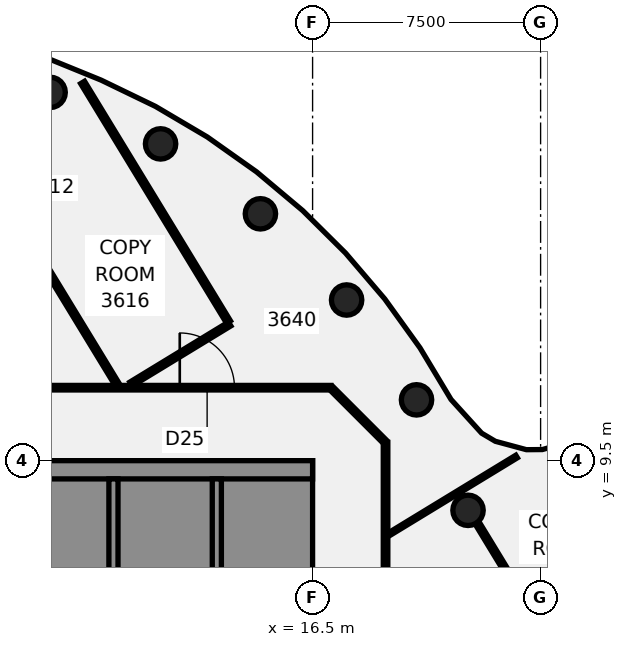
"""IFC4 building model, lengths in metres.
Left out: names, types, materials, properties, quantities, classifications, styles, units other than length and angle.
Written with IfcOpenShell. Run it as: python <this file> out.ifc"""

import sys

from ifc_helpers import new_model, si_unit, direction, frame, frame_2d, origin, origin_2d, place, context, subcontext, project, spatial, polyline, rectangle, circle, outline, extrude, element, fill, save


model = new_model("IFC4")
c1 = context("Model", 3, precision=1e-05, world=origin(), true_north=direction((0.0, 1.0)))
c2 = subcontext(c1, "Body", "Model", "MODEL_VIEW")
j1 = project(units=[si_unit("LENGTHUNIT", "METRE"), si_unit("PLANEANGLEUNIT", "RADIAN")], contexts=[c1])
p1 = place(None, origin())
s1 = spatial("IfcSite", under=j1, at=p1, CompositionType="ELEMENT")
p2 = place(p1, origin())
s2 = spatial("IfcBuilding", under=s1, at=p2, CompositionType="ELEMENT")
p3 = place(p2, frame((0.0, 0.0, 148.0)))
s3 = spatial("IfcBuildingStorey", under=s2, at=p3, CompositionType="ELEMENT", Elevation=148.0)
for number, where, z_axis, x_axis in (
    (1, (21.613, 7.866, -0.14), (0.0, 0.0, 1.0), (1.0, 0.0, 0.0)),
    (2, (19.919, 11.5, -0.14), (0.0, 0.0, 1.0), (1.0, 0.0, 0.0)),
    (3, (17.619, 14.784, -0.14), (0.0, 0.0, 1.0), (1.0, 0.0, 0.0)),
    (4, (14.784, 17.619, -0.14), (0.0, 0.0, 1.0), (1.0, 0.0, 0.0)),
    (5, (11.5, 19.919, -0.14), (0.0, 0.0, 1.0), (1.0, 0.0, 0.0)),
    (6, (7.866, 21.613, -0.14), (0.0, 0.0, 1.0), (1.0, 0.0, 0.0)),
):
    element("IfcColumn", number, at=place(p3, frame(where, z_axis=z_axis, x_axis=x_axis)), inside=s3, PredefinedType="COLUMN", context=c2, shape_type="SweptSolid", body=[
        extrude(circle(Radius=0.5, at=origin_2d()), origin(), (0.0, 0.0, 1.0), 3.75),
    ])
p4 = place(p3, frame((3.813, 22.277, 0.0), z_axis=(0.0, 0.0, 1.0), x_axis=(0.52031356714, -0.853975287611, 0.0)))
e7 = element("IfcWall", 7, at=p4, inside=s3, PredefinedType="PARTITIONING", context=c2, shape_type="SweptSolid", body=[
    extrude(rectangle(XDim=12.04, YDim=0.15, at=frame_2d((6.02, 0.0))), origin(), (0.0, 0.0, 1.0), 3.01),
])
p5 = place(p4, frame((4.023, 0.0, 0.0)))
e8 = element("IfcOpeningElement", 8, at=p5, cuts=e7, PredefinedType="OPENING", context=c2, shape_type="SweptSolid", body=[
    extrude(rectangle(XDim=0.9, YDim=2.1, at=frame_2d((0.45, 1.05))), frame((0.0, 0.085, 0.0), z_axis=(0.0, -1.0, 0.0), x_axis=(1.0, 0.0, 0.0)), (0.0, 0.0, 1.0), 0.17),
])
p6 = place(p3, frame((8.935, 21.939, 0.0), z_axis=(0.0, 0.0, 1.0), x_axis=(0.520139186157, -0.854081510761, 0.0)))
e9 = element("IfcWall", 9, at=p6, inside=s3, PredefinedType="PARTITIONING", context=c2, shape_type="SweptSolid", body=[
    extrude(rectangle(XDim=9.226, YDim=0.15, at=frame_2d((4.613, 0.0))), origin(), (0.0, 0.0, 1.0), 3.01),
])
p7 = place(p3, frame((21.905, 7.462, 0.0), z_axis=(0.0, 0.0, 1.0), x_axis=(0.520124017565, -0.854090748312, 0.0)))
e10 = element("IfcWall", 10, at=p7, inside=s3, PredefinedType="PARTITIONING", context=c2, shape_type="SweptSolid", body=[
    extrude(rectangle(XDim=13.121, YDim=0.15, at=frame_2d((6.561, 0.0))), origin(), (0.0, 0.0, 1.0), 3.01),
])
p8 = place(p7, frame((5.822, 0.0, 0.0)))
e11 = element("IfcOpeningElement", 11, at=p8, cuts=e10, PredefinedType="OPENING", context=c2, shape_type="SweptSolid", body=[
    extrude(rectangle(XDim=1.4, YDim=2.1, at=frame_2d((0.7, 1.05))), frame((0.0, 0.085, 0.0), z_axis=(0.0, -1.0, 0.0), x_axis=(1.0, 0.0, 0.0)), (0.0, 0.0, 1.0), 0.17),
])
p9 = place(p3, frame((17.128, 11.872, 0.0), z_axis=(0.0, 0.0, 1.0), x_axis=(0.707106781187, -0.707106781187, 0.0)))
e12 = element("IfcWall", 12, at=p9, inside=s3, PredefinedType="PARTITIONING", context=c2, shape_type="SweptSolid", body=[
    extrude(rectangle(XDim=2.465, YDim=0.15, at=frame_2d((1.232, 0.0))), origin(), (0.0, 0.0, 1.0), 3.01),
])
p10 = place(p3, frame((-17.065, 11.9, 0.0), z_axis=(0.0, 0.0, 1.0), x_axis=(1.0, 0.0, 0.0)))
e13 = element("IfcWall", 13, at=p10, inside=s3, PredefinedType="PARTITIONING", context=c2, shape_type="SweptSolid", body=[
    extrude(rectangle(XDim=34.165, YDim=0.15, at=frame_2d((17.083, 0.0))), origin(), (0.0, 0.0, 1.0), 3.01),
])
p11 = place(p10, frame((22.386, 0.0, 0.0)))
e14 = element("IfcOpeningElement", 14, at=p11, cuts=e13, PredefinedType="OPENING", context=c2, shape_type="SweptSolid", body=[
    extrude(rectangle(XDim=1.8, YDim=2.1, at=frame_2d((0.9, 1.05))), frame((0.0, 0.085, 0.0), z_axis=(0.0, -1.0, 0.0), x_axis=(1.0, 0.0, 0.0)), (0.0, 0.0, 1.0), 0.17),
])
p12 = place(p10, frame((29.196, 0.0, 0.0)))
e15 = element("IfcOpeningElement", 15, at=p12, cuts=e13, PredefinedType="OPENING", context=c2, shape_type="SweptSolid", body=[
    extrude(rectangle(XDim=1.8, YDim=2.1, at=frame_2d((0.9, 1.05))), frame((0.0, 0.085, 0.0), z_axis=(0.0, -1.0, 0.0), x_axis=(1.0, 0.0, 0.0)), (0.0, 0.0, 1.0), 0.17),
])
p13 = place(p10, frame((6.265, 0.0, 0.0)))
e16 = element("IfcOpeningElement", 16, at=p13, cuts=e13, PredefinedType="OPENING", context=c2, shape_type="SweptSolid", body=[
    extrude(rectangle(XDim=1.8, YDim=2.1, at=frame_2d((0.9, 1.05))), frame((0.0, 0.085, 0.0), z_axis=(0.0, -1.0, 0.0), x_axis=(1.0, 0.0, 0.0)), (0.0, 0.0, 1.0), 0.17),
])
p14 = place(p3, frame((10.527, 12.02, 0.0), z_axis=(0.0, 0.0, 1.0), x_axis=(0.854084398949, 0.520134443651, 0.0)))
e17 = element("IfcWall", 17, at=p14, inside=s3, PredefinedType="PARTITIONING", context=c2, shape_type="SweptSolid", body=[
    extrude(rectangle(XDim=3.8, YDim=0.15, at=frame_2d((1.9, 0.0))), origin(), (0.0, 0.0, 1.0), 3.01),
])
p15 = place(p3, frame((18.981, 7.06, 0.0), z_axis=(0.0, 0.0, 1.0), x_axis=(0.854024301645, 0.520233113326, 0.0)))
e18 = element("IfcWall", 18, at=p15, inside=s3, PredefinedType="PARTITIONING", context=c2, shape_type="SweptSolid", body=[
    extrude(rectangle(XDim=4.952, YDim=0.1, at=frame_2d((2.476, 0.0))), origin(), (0.0, 0.0, 1.0), 3.01),
])
p16 = place(p3, frame((18.9, -10.1, 0.0), z_axis=(0.0, 0.0, 1.0), x_axis=(0.0, 1.0, 0.0)))
e19 = element("IfcWall", 19, at=p16, inside=s3, PredefinedType="PARTITIONING", context=c2, shape_type="SweptSolid", body=[
    extrude(rectangle(XDim=20.2, YDim=0.15, at=frame_2d((10.1, 0.0))), origin(), (0.0, 0.0, 1.0), 3.01),
])
p17 = place(p16, frame((8.281, 0.0, 0.0)))
e20 = element("IfcOpeningElement", 20, at=p17, cuts=e19, PredefinedType="OPENING", context=c2, shape_type="SweptSolid", body=[
    extrude(rectangle(XDim=1.8, YDim=2.1, at=frame_2d((0.9, 1.05))), frame((0.0, 0.085, 0.0), z_axis=(0.0, -1.0, 0.0), x_axis=(1.0, 0.0, 0.0)), (0.0, 0.0, 1.0), 0.17),
])
p18 = place(p16, frame((13.543, 0.0, 0.0)))
e21 = element("IfcOpeningElement", 21, at=p18, cuts=e19, PredefinedType="OPENING", context=c2, shape_type="SweptSolid", body=[
    extrude(rectangle(XDim=0.9, YDim=2.1, at=frame_2d((0.45, 1.05))), frame((0.0, 0.085, 0.0), z_axis=(0.0, -1.0, 0.0), x_axis=(1.0, 0.0, 0.0)), (0.0, 0.0, 1.0), 0.17),
])
p19 = place(p3, origin())
e22 = element("IfcWall", 22, at=p19, inside=s3, PredefinedType="SHEAR", context=c2, shape_type="SweptSolid", body=[
    extrude(outline(polyline([(13.5, -8.125), (13.5, -8.9), (15.9, -8.9), (16.5, -8.9), (16.5, 8.9), (15.9, 8.9), (13.5, 8.9), (13.5, 8.125), (15.9, 8.125), (15.9, 5.625), (13.5, 5.625), (13.5, 5.375), (15.9, 5.375), (15.9, -5.375), (13.5, -5.375), (13.5, -5.625), (15.9, -5.625), (15.9, -8.125), (13.5, -8.125)])), origin(), (0.0, 0.0, 1.0), 3.61),
])
p20 = place(p3, frame((16.5, 9.2, 0.0), z_axis=(0.0, 0.0, 1.0), x_axis=(-1.0, 0.0, 0.0)))
e23 = element("IfcWall", 23, at=p20, inside=s3, PredefinedType="SHEAR", context=c2, shape_type="SweptSolid", body=[
    extrude(rectangle(XDim=13.0, YDim=0.6, at=frame_2d((6.5, 0.0))), origin(), (0.0, 0.0, 1.0), 3.61),
])
p21 = place(p3, origin())
e24 = element("IfcWall", 24, at=p21, inside=s3, PredefinedType="SHEAR", context=c2, shape_type="SweptSolid", body=[
    extrude(outline(polyline([(9.8, -5.375), (7.5, -5.375), (7.5, -2.875), (9.8, -2.875), (9.8, -2.625), (7.5, -2.625), (7.5, -0.125), (9.8, -0.125), (9.8, 0.125), (7.5, 0.125), (7.5, 2.625), (9.8, 2.625), (9.8, 2.875), (7.5, 2.875), (7.5, 5.375), (9.8, 5.375), (9.8, 5.625), (7.5, 5.625), (7.5, 8.125), (9.8, 8.125), (9.8, 8.9), (7.5, 8.9), (7.2, 8.9), (7.2, -5.625), (7.5, -5.625), (9.8, -5.625), (9.8, -5.375)])), origin(), (0.0, 0.0, 1.0), 3.61),
])
p22 = place(p3, frame((13.35, -8.9, 0.0), z_axis=(0.0, 0.0, 1.0), x_axis=(0.0, 1.0, 0.0)))
e25 = element("IfcWall", 25, at=p22, inside=s3, PredefinedType="SHEAR", context=c2, shape_type="SweptSolid", body=[
    extrude(rectangle(XDim=17.8, YDim=0.3, at=frame_2d((8.9, 0.0))), origin(), (0.0, 0.0, 1.0), 3.61),
])
p23 = place(p22, frame((1.325, 0.0, 0.0)))
e26 = element("IfcOpeningElement", 26, at=p23, cuts=e25, PredefinedType="OPENING", context=c2, shape_type="SweptSolid", body=[
    extrude(rectangle(XDim=1.4, YDim=2.1, at=frame_2d((0.7, 1.05))), frame((0.0, 0.16, 0.0), z_axis=(0.0, -1.0, 0.0), x_axis=(1.0, 0.0, 0.0)), (0.0, 0.0, 1.0), 0.32),
])
p24 = place(p22, frame((8.4, 0.0, 0.0)))
e27 = element("IfcOpeningElement", 27, at=p24, cuts=e25, PredefinedType="OPENING", context=c2, shape_type="SweptSolid", body=[
    extrude(rectangle(XDim=1.0, YDim=2.1, at=frame_2d((0.5, 1.05))), frame((0.0, 0.16, 0.0), z_axis=(0.0, -1.0, 0.0), x_axis=(1.0, 0.0, 0.0)), (0.0, 0.0, 1.0), 0.32),
])
p25 = place(p3, frame((9.95, -8.9, 0.0), z_axis=(0.0, 0.0, 1.0), x_axis=(0.0, 1.0, 0.0)))
e28 = element("IfcWall", 28, at=p25, inside=s3, PredefinedType="SHEAR", context=c2, shape_type="SweptSolid", body=[
    extrude(rectangle(XDim=17.8, YDim=0.3, at=frame_2d((8.9, 0.0))), origin(), (0.0, 0.0, 1.0), 3.61),
])
p26 = place(p25, frame((4.175, 0.0, 0.0)))
e29 = element("IfcOpeningElement", 29, at=p26, cuts=e28, PredefinedType="OPENING", context=c2, shape_type="SweptSolid", body=[
    extrude(rectangle(XDim=1.2, YDim=2.1, at=frame_2d((0.6, 1.05))), frame((0.0, 0.16, 0.0), z_axis=(0.0, -1.0, 0.0), x_axis=(1.0, 0.0, 0.0)), (0.0, 0.0, 1.0), 0.32),
])
p27 = place(p25, frame((6.925, 0.0, 0.0)))
e30 = element("IfcOpeningElement", 30, at=p27, cuts=e28, PredefinedType="OPENING", context=c2, shape_type="SweptSolid", body=[
    extrude(rectangle(XDim=1.2, YDim=2.1, at=frame_2d((0.6, 1.05))), frame((0.0, 0.16, 0.0), z_axis=(0.0, -1.0, 0.0), x_axis=(1.0, 0.0, 0.0)), (0.0, 0.0, 1.0), 0.32),
])
p28 = place(p12, origin())
e31 = element("IfcDoor", 31, at=p28, inside=s3, OperationType="DOUBLE_DOOR_SINGLE_SWING", PredefinedType="DOOR", context=c2, shape_type="SweptSolid", body=[
    extrude(rectangle(XDim=1.8, YDim=2.1, at=frame_2d((0.9, 1.05))), frame((0.0, 0.025, 0.0), z_axis=(0.0, -1.0, 0.0), x_axis=(1.0, 0.0, 0.0)), (0.0, 0.0, 1.0), 0.05),
])
fill(e15, e31)
save(model, sys.argv[1])
